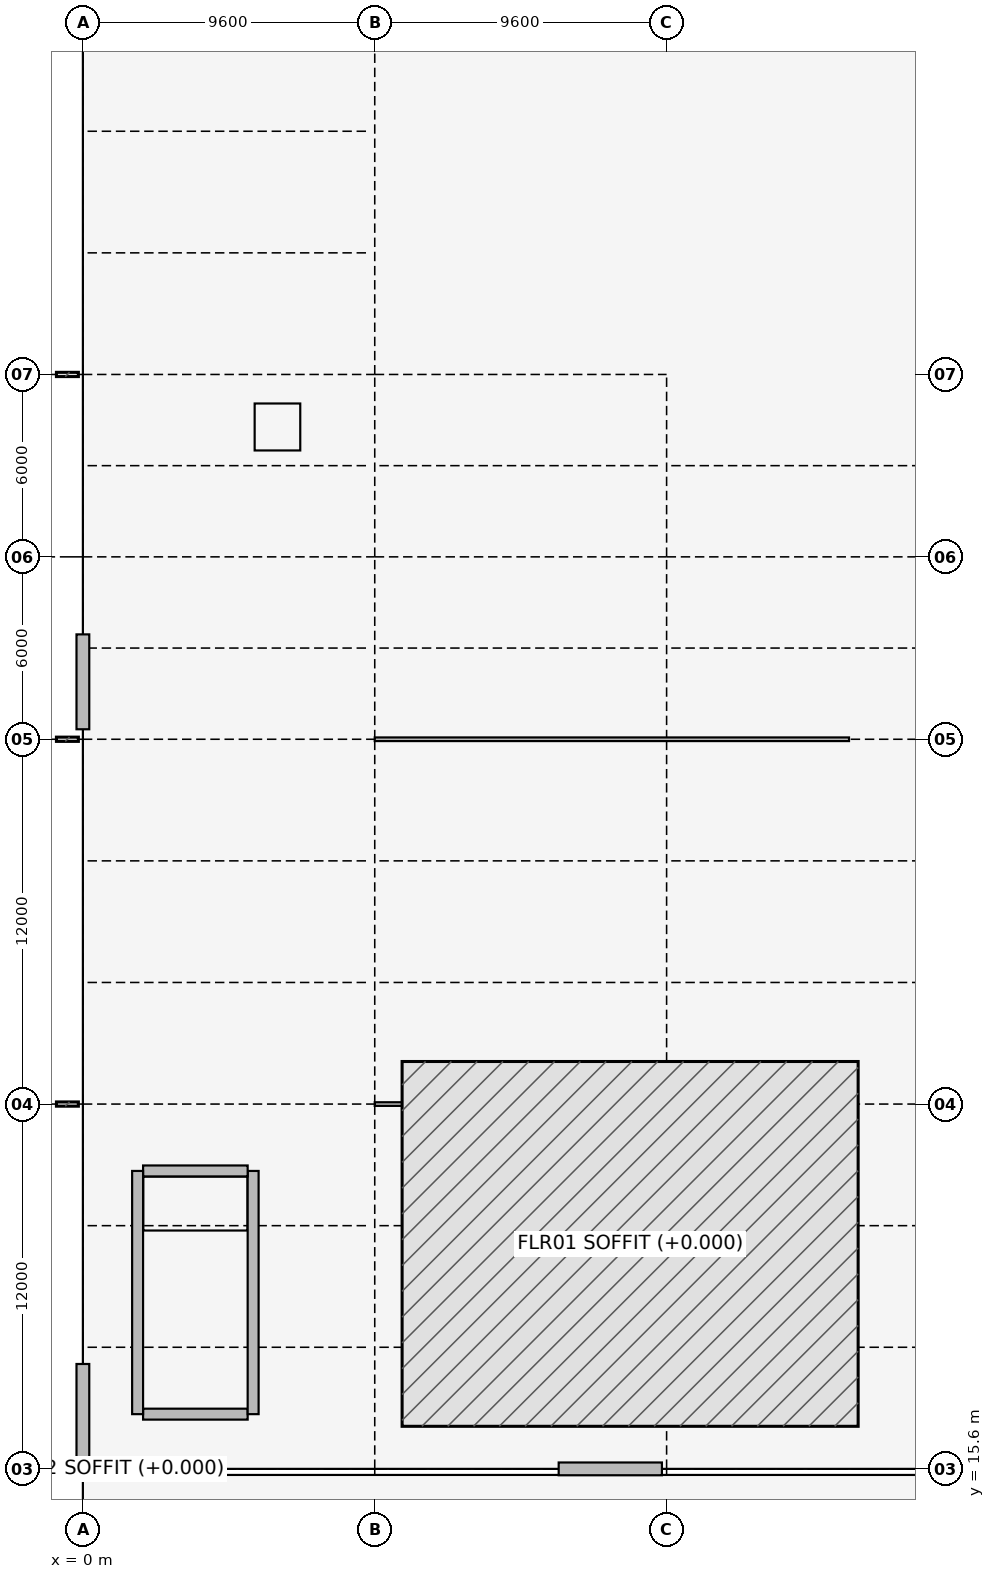
"""IFC4 building model, lengths in metres.
Left out: names, types, materials, properties, quantities, classifications, styles, units other than length and angle.
Written with IfcOpenShell. Run it as: python <this file> out.ifc"""

import sys

from ifc_helpers import new_model, si_unit, direction, frame, frame_2d, origin, origin_2d, place, context, subcontext, project, spatial, rectangle, hollow_circle, i_section, extrude, element, fill, save


model = new_model("IFC4")
c1 = context("Model", 3, precision=1e-05, world=origin(), true_north=direction((0.0, 1.0)))
c2 = subcontext(c1, "Body", "Model", "MODEL_VIEW")
j1 = project(units=[si_unit("LENGTHUNIT", "METRE"), si_unit("PLANEANGLEUNIT", "RADIAN")], contexts=[c1])
p1 = place(None, origin())
s1 = spatial("IfcSite", under=j1, at=p1, CompositionType="ELEMENT")
p2 = place(p1, origin())
s2 = spatial("IfcBuilding", under=s1, at=p2, CompositionType="ELEMENT")
p3 = place(p2, origin())
s3 = spatial("IfcBuildingStorey", under=s2, at=p3, CompositionType="ELEMENT", Elevation=0.0)
for number, where, z_axis, x_axis in (
    (1, (0.0, 15.6, 0.0), (0.0, 0.0, 1.0), (1.0, 0.0, 0.0)),
    (2, (0.0, 27.6, 0.0), (0.0, 0.0, 1.0), (1.0, 0.0, 0.0)),
    (3, (0.0, 39.6, 0.0), (0.0, 0.0, 1.0), (1.0, 0.0, 0.0)),
    (4, (0.0, 45.6, 0.0), (0.0, 0.0, 1.0), (1.0, 0.0, 0.0)),
    (5, (0.0, 51.6, 0.0), (0.0, 0.0, 1.0), (1.0, 0.0, 0.0)),
):
    element("IfcColumn", number, at=place(p3, frame(where, z_axis=z_axis, x_axis=x_axis)), inside=s3, PredefinedType="COLUMN", context=c2, shape_type="SweptSolid", body=[
        extrude(i_section(OverallWidth=0.3, OverallDepth=0.65, WebThickness=0.016, FlangeThickness=0.031, FilletRadius=0.027, at=origin_2d()), origin(), (0.0, 0.0, 1.0), 5.4),
    ])
for number, where, z_axis, x_axis in (
    (6, (9.6, 15.6, 0.0), (0.0, 0.0, 1.0), (1.0, 0.0, 0.0)),
    (7, (9.6, 27.6, 0.0), (0.0, 0.0, 1.0), (1.0, 0.0, 0.0)),
    (8, (9.6, 39.6, 0.0), (0.0, 0.0, 1.0), (1.0, 0.0, 0.0)),
    (9, (9.6, 45.6, 0.0), (0.0, 0.0, 1.0), (1.0, 0.0, 0.0)),
    (10, (9.6, 51.6, 0.0), (0.0, 0.0, 1.0), (1.0, 0.0, 0.0)),
    (11, (19.2, 15.6, 0.0), (0.0, 0.0, 1.0), (1.0, 0.0, 0.0)),
    (12, (19.2, 27.6, 0.0), (0.0, 0.0, 1.0), (1.0, 0.0, 0.0)),
):
    element("IfcColumn", number, at=place(p3, frame(where, z_axis=z_axis, x_axis=x_axis)), inside=s3, PredefinedType="COLUMN", context=c2, shape_type="SweptSolid", body=[
        extrude(i_section(OverallWidth=0.3, OverallDepth=0.44, WebThickness=0.011, FlangeThickness=0.021, FilletRadius=0.027, at=origin_2d()), origin(), (0.0, 0.0, 1.0), 5.4),
    ])
p4 = place(p3, frame((5.42, 17.4, 0.0), z_axis=(0.0, 0.0, 1.0), x_axis=(-1.0, 0.0, 0.0)))
e13 = element("IfcWall", 13, at=p4, inside=s3, PredefinedType="SHEAR", context=c2, shape_type="SweptSolid", body=[
    extrude(rectangle(XDim=3.44, YDim=0.36, at=frame_2d((1.72, 0.0))), origin(), (0.0, 0.0, 1.0), 5.12),
])
p5 = place(p4, frame((0.95, 0.0, 0.0)))
e14 = element("IfcOpeningElement", 14, at=p5, cuts=e13, PredefinedType="OPENING", context=c2, shape_type="SweptSolid", body=[
    extrude(rectangle(XDim=1.1, YDim=2.15, at=frame_2d((0.55, 1.075))), frame((0.0, 0.19, 0.0), z_axis=(0.0, -1.0, 0.0), x_axis=(1.0, 0.0, 0.0)), (0.0, 0.0, 1.0), 0.38),
])
p6 = place(p3, frame((5.6, 17.4, 0.0), z_axis=(0.0, 0.0, 1.0), x_axis=(0.0, 1.0, 0.0)))
e15 = element("IfcWall", 15, at=p6, inside=s3, PredefinedType="SHEAR", context=c2, shape_type="SweptSolid", body=[
    extrude(rectangle(XDim=8.0, YDim=0.36, at=frame_2d((4.0, 0.0))), origin(), (0.0, 0.0, 1.0), 5.12),
])
p7 = place(p3, frame((5.42, 25.4, 0.0), z_axis=(0.0, 0.0, 1.0), x_axis=(-1.0, 0.0, 0.0)))
e16 = element("IfcWall", 16, at=p7, inside=s3, PredefinedType="SHEAR", context=c2, shape_type="SweptSolid", body=[
    extrude(rectangle(XDim=3.44, YDim=0.36, at=frame_2d((1.72, 0.0))), origin(), (0.0, 0.0, 1.0), 5.12),
])
p8 = place(p3, frame((1.8, 25.4, 0.0), z_axis=(0.0, 0.0, 1.0), x_axis=(0.0, -1.0, 0.0)))
e17 = element("IfcWall", 17, at=p8, inside=s3, PredefinedType="SHEAR", context=c2, shape_type="SweptSolid", body=[
    extrude(rectangle(XDim=8.0, YDim=0.36, at=frame_2d((4.0, 0.0))), origin(), (0.0, 0.0, 1.0), 5.12),
])
p9 = place(p3, frame((0.0, 15.929, 0.0), z_axis=(0.0, 0.0, 1.0), x_axis=(0.0, 1.0, 0.0)))
e18 = element("IfcWall", 18, at=p9, inside=s3, PredefinedType="STANDARD", context=c2, shape_type="SweptSolid", body=[
    extrude(rectangle(XDim=3.121, YDim=0.42, at=frame_2d((1.561, 0.0))), origin(), (0.0, 0.0, 1.0), 4.7),
])
p10 = place(p9, frame((0.42, 0.0, 0.0)))
e19 = element("IfcOpeningElement", 19, at=p10, cuts=e18, PredefinedType="OPENING", context=c2, shape_type="SweptSolid", body=[
    extrude(rectangle(XDim=2.4, YDim=2.4, at=frame_2d((1.2, 1.2))), frame((0.0, 0.22, 0.0), z_axis=(0.0, -1.0, 0.0), x_axis=(1.0, 0.0, 0.0)), (0.0, 0.0, 1.0), 0.44),
])
p11 = place(p3, frame((0.0, 39.929, 0.0), z_axis=(0.0, 0.0, 1.0), x_axis=(0.0, 1.0, 0.0)))
e20 = element("IfcWall", 20, at=p11, inside=s3, PredefinedType="STANDARD", context=c2, shape_type="SweptSolid", body=[
    extrude(rectangle(XDim=3.121, YDim=0.42, at=frame_2d((1.561, 0.0))), origin(), (0.0, 0.0, 1.0), 4.7),
])
p12 = place(p11, frame((0.48, 0.0, 0.0)))
e21 = element("IfcOpeningElement", 21, at=p12, cuts=e20, PredefinedType="OPENING", context=c2, shape_type="SweptSolid", body=[
    extrude(rectangle(XDim=2.2, YDim=2.4, at=frame_2d((1.1, 1.2))), frame((0.0, 0.22, 0.0), z_axis=(0.0, -1.0, 0.0), x_axis=(1.0, 0.0, 0.0)), (0.0, 0.0, 1.0), 0.44),
])
p13 = place(p3, frame((19.046, 15.6, 0.0), z_axis=(0.0, 0.0, 1.0), x_axis=(-1.0, 0.0, 0.0)))
e22 = element("IfcWall", 22, at=p13, inside=s3, PredefinedType="STANDARD", context=c2, shape_type="SweptSolid", body=[
    extrude(rectangle(XDim=3.396, YDim=0.42, at=frame_2d((1.698, 0.0))), origin(), (0.0, 0.0, 1.0), 4.7),
])
p14 = place(p13, frame((0.45, 0.0, 0.0)))
e23 = element("IfcOpeningElement", 23, at=p14, cuts=e22, PredefinedType="OPENING", context=c2, shape_type="SweptSolid", body=[
    extrude(rectangle(XDim=2.4, YDim=2.4, at=frame_2d((1.2, 1.2))), frame((0.0, 0.22, 0.0), z_axis=(0.0, -1.0, 0.0), x_axis=(1.0, 0.0, 0.0)), (0.0, 0.0, 1.0), 0.44),
])
for number, where, z_axis, x_axis in (
    (24, (9.6, 27.6, 0.0), (0.0, 0.0, 1.0), (1.0, 0.0, 0.0)),
    (25, (9.6, 39.6, 0.0), (0.0, 0.0, 1.0), (1.0, 0.0, 0.0)),
):
    element("IfcWall", number, at=place(p3, frame(where, z_axis=z_axis, x_axis=x_axis)), inside=s3, PredefinedType="PARTITIONING", context=c2, shape_type="SweptSolid", body=[
        extrude(rectangle(XDim=15.6, YDim=0.12, at=frame_2d((7.8, 0.0))), origin(), (0.0, 0.0, 1.0), 2.4),
    ])
for number, where, z_axis, x_axis in (
    (26, (5.57, 49.1, 0.0), (0.0, 0.0, 1.0), (1.0, 0.0, 0.0)),
    (27, (7.23, 49.1, 0.0), (0.0, 0.0, 1.0), (1.0, 0.0, 0.0)),
):
    element("IfcColumn", number, at=place(p3, frame(where, z_axis=z_axis, x_axis=x_axis)), inside=s3, PredefinedType="COLUMN", context=c2, shape_type="SweptSolid", body=[
        extrude(hollow_circle(Radius=0.136, WallThickness=0.012, at=origin_2d()), origin(), (0.0, 0.0, 1.0), 5.23),
    ])
p15 = place(p10, origin())
e28 = element("IfcDoor", 28, at=p15, inside=s3, OperationType="DOUBLE_DOOR_SINGLE_SWING", PredefinedType="DOOR", context=c2, shape_type="SweptSolid", body=[
    extrude(rectangle(XDim=2.4, YDim=2.4, at=frame_2d((1.2, 1.2))), frame((0.0, 0.025, 0.0), z_axis=(0.0, -1.0, 0.0), x_axis=(1.0, 0.0, 0.0)), (0.0, 0.0, 1.0), 0.05),
])
fill(e19, e28)
p16 = place(p12, origin())
e29 = element("IfcDoor", 29, at=p16, inside=s3, OperationType="DOUBLE_DOOR_SINGLE_SWING", PredefinedType="DOOR", context=c2, shape_type="SweptSolid", body=[
    extrude(rectangle(XDim=2.2, YDim=2.4, at=frame_2d((1.1, 1.2))), frame((0.0, 0.025, 0.0), z_axis=(0.0, -1.0, 0.0), x_axis=(1.0, 0.0, 0.0)), (0.0, 0.0, 1.0), 0.05),
])
fill(e21, e29)
p17 = place(p14, origin())
e30 = element("IfcDoor", 30, at=p17, inside=s3, OperationType="DOUBLE_DOOR_SINGLE_SWING", PredefinedType="DOOR", context=c2, shape_type="SweptSolid", body=[
    extrude(rectangle(XDim=2.4, YDim=2.4, at=frame_2d((1.2, 1.2))), frame((0.0, 0.025, 0.0), z_axis=(0.0, -1.0, 0.0), x_axis=(1.0, 0.0, 0.0)), (0.0, 0.0, 1.0), 0.05),
])
fill(e23, e30)
p18 = place(p5, origin())
e31 = element("IfcDoor", 31, at=p18, inside=s3, OperationType="SINGLE_SWING_RIGHT", PredefinedType="DOOR", context=c2, shape_type="SweptSolid", body=[
    extrude(rectangle(XDim=1.1, YDim=2.15, at=frame_2d((0.55, 1.075))), frame((0.0, 0.025, 0.0), z_axis=(0.0, -1.0, 0.0), x_axis=(1.0, 0.0, 0.0)), (0.0, 0.0, 1.0), 0.05),
])
fill(e14, e31)
save(model, sys.argv[1])
